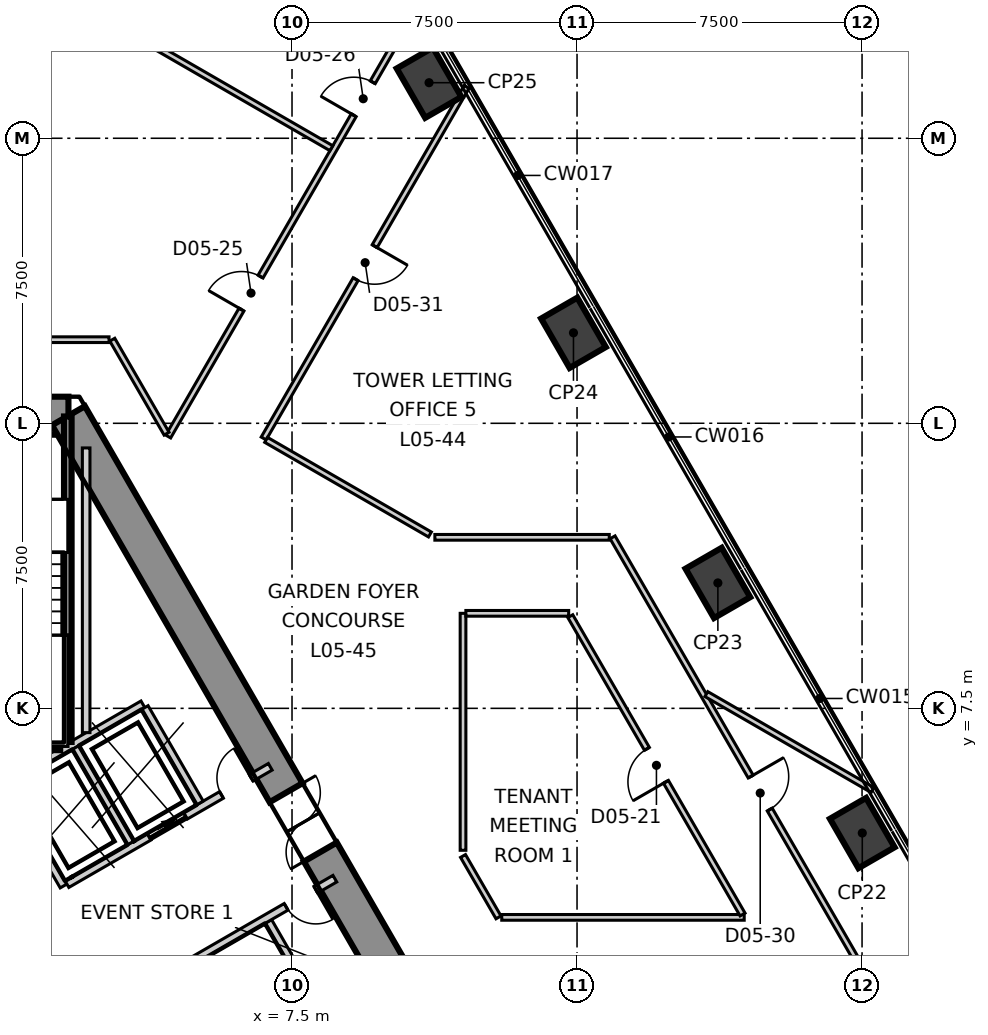
"""IFC4 building model, lengths in metres.
Left out: names, types, materials, properties, quantities, classifications, styles, units other than length and angle.
Written with IfcOpenShell. Run it as: python <this file> out.ifc"""

import sys

from ifc_helpers import new_model, si_unit, direction, frame, frame_2d, origin, origin_2d, place, context, subcontext, project, spatial, polyline, rectangle, outline, extrude, element, fill, save


model = new_model("IFC4")
c1 = context("Model", 3, precision=1e-05, world=origin(), true_north=direction((0.0, 1.0)))
c2 = subcontext(c1, "Body", "Model", "MODEL_VIEW")
j1 = project(units=[si_unit("LENGTHUNIT", "METRE"), si_unit("PLANEANGLEUNIT", "RADIAN")], contexts=[c1])
p1 = place(None, origin())
s1 = spatial("IfcSite", under=j1, at=p1, CompositionType="ELEMENT")
p2 = place(p1, origin())
s2 = spatial("IfcBuilding", under=s1, at=p2, CompositionType="ELEMENT")
p3 = place(p2, frame((0.0, 0.0, 30.3)))
s3 = spatial("IfcBuildingStorey", under=s2, at=p3, CompositionType="ELEMENT", Elevation=30.3)
p4 = place(p3, frame((1.617, 15.2, -0.4), z_axis=(0.0, 0.0, 1.0), x_axis=(-1.0, 0.0, 0.0)))
e1 = element("IfcWall", 1, at=p4, inside=s3, PredefinedType="SHEAR", context=c2, shape_type="SweptSolid", body=[
    extrude(outline(polyline([(-0.288, -0.5), (1.617, -0.5), (3.522, -0.5), (2.945, 0.5), (1.617, 0.5), (0.289, 0.5), (-0.288, -0.5)])), origin(), (0.0, 0.0, 1.0), 5.1),
])
p5 = place(p4, frame((0.917, 0.0, 0.4)))
e2 = element("IfcOpeningElement", 2, at=p5, cuts=e1, PredefinedType="OPENING", context=c2, shape_type="SweptSolid", body=[
    extrude(rectangle(XDim=1.4, YDim=2.1, at=frame_2d((0.7, 1.05))), frame((0.0, 0.51, 0.0), z_axis=(0.0, -1.0, 0.0), x_axis=(1.0, 0.0, 0.0)), (0.0, 0.0, 1.0), 1.02),
])
p6 = place(p3, frame((13.972, -6.2, -0.4), z_axis=(0.0, 0.0, 1.0), x_axis=(-0.499992141631, 0.866029940768, 0.0)))
e3 = element("IfcWall", 3, at=p6, inside=s3, PredefinedType="SHEAR", context=c2, shape_type="SweptSolid", body=[
    extrude(outline(polyline([(-0.288, -0.5), (1.657, -0.5), (3.602, -0.5), (5.547, -0.5), (7.493, -0.5), (9.438, -0.5), (11.383, -0.5), (13.328, -0.5), (15.273, -0.5), (17.218, -0.499), (19.164, -0.499), (21.109, -0.499), (23.054, -0.499), (24.999, -0.499), (24.422, 0.5), (22.566, 0.5), (20.709, 0.5), (18.853, 0.5), (16.996, 0.5), (15.14, 0.5), (13.283, 0.5), (11.427, 0.5), (9.57, 0.5), (7.714, 0.5), (5.857, 0.5), (4.001, 0.5), (2.145, 0.5), (0.288, 0.5), (-0.288, -0.5)])), origin(), (0.0, 0.0, 1.0), 5.1),
])
p7 = place(p6, frame((11.455, 0.0, 0.4)))
e4 = element("IfcOpeningElement", 4, at=p7, cuts=e3, PredefinedType="OPENING", context=c2, shape_type="SweptSolid", body=[
    extrude(rectangle(XDim=1.8, YDim=2.1, at=frame_2d((0.9, 1.05))), frame((0.0, 0.51, 0.0), z_axis=(0.0, -1.0, 0.0), x_axis=(1.0, 0.0, 0.0)), (0.0, 0.0, 1.0), 1.02),
])
for number, where, z_axis, x_axis in (
    (5, (22.506, 4.219, -0.4), (0.0, 0.0, 1.0), (-0.5, 0.866, 0.0)),
    (6, (18.706, 10.8, -0.4), (0.0, 0.0, 1.0), (-0.5, 0.866, 0.0)),
    (7, (14.906, 17.381, -0.4), (0.0, 0.0, 1.0), (-0.5, 0.866, 0.0)),
    (8, (11.106, 23.962, -0.4), (0.0, 0.0, 1.0), (-0.5, 0.866, 0.0)),
):
    element("IfcColumn", number, at=place(p3, frame(where, z_axis=z_axis, x_axis=x_axis)), inside=s3, PredefinedType="COLUMN", context=c2, shape_type="SweptSolid", body=[
        extrude(rectangle(XDim=1.5, YDim=1.1, at=origin_2d()), origin(), (0.0, 0.0, 1.0), 5.1),
    ])
p8 = place(p3, frame((4.242, 14.652, 0.0), z_axis=(0.0, 0.0, 1.0), x_axis=(0.500016782699, 0.866015714072, 0.0)))
e9 = element("IfcWall", 9, at=p8, inside=s3, PredefinedType="PARTITIONING", context=c2, shape_type="SweptSolid", body=[
    extrude(rectangle(XDim=13.164, YDim=0.15, at=frame_2d((6.582, 0.0))), origin(), (0.0, 0.0, 1.0), 4.7),
])
p9 = place(p8, frame((3.858, 0.0, 0.0)))
e10 = element("IfcOpeningElement", 10, at=p9, cuts=e9, PredefinedType="OPENING", context=c2, shape_type="SweptSolid", body=[
    extrude(rectangle(XDim=1.0, YDim=2.1, at=frame_2d((0.5, 1.05))), frame((0.0, 0.085, 0.0), z_axis=(0.0, -1.0, 0.0), x_axis=(1.0, 0.0, 0.0)), (0.0, 0.0, 1.0), 0.17),
])
p10 = place(p8, frame((9.763, 0.0, 0.0)))
e11 = element("IfcOpeningElement", 11, at=p10, cuts=e9, PredefinedType="OPENING", context=c2, shape_type="SweptSolid", body=[
    extrude(rectangle(XDim=1.0, YDim=2.1, at=frame_2d((0.5, 1.05))), frame((0.0, 0.085, 0.0), z_axis=(0.0, -1.0, 0.0), x_axis=(1.0, 0.0, 0.0)), (0.0, 0.0, 1.0), 0.17),
])
p11 = place(p3, frame((6.754, 14.601, 0.0), z_axis=(0.0, 0.0, 1.0), x_axis=(0.499932177464, 0.866064557603, 0.0)))
e12 = element("IfcWall", 12, at=p11, inside=s3, PredefinedType="PARTITIONING", context=c2, shape_type="SweptSolid", body=[
    extrude(rectangle(XDim=10.682, YDim=0.15, at=frame_2d((5.341, 0.0))), origin(), (0.0, 0.0, 1.0), 4.1),
])
p12 = place(p11, frame((4.841, 0.0, 0.0)))
e13 = element("IfcOpeningElement", 13, at=p12, cuts=e12, PredefinedType="OPENING", context=c2, shape_type="SweptSolid", body=[
    extrude(rectangle(XDim=1.0, YDim=2.1, at=frame_2d((0.5, 1.05))), frame((0.0, 0.085, 0.0), z_axis=(0.0, -1.0, 0.0), x_axis=(1.0, 0.0, 0.0)), (0.0, 0.0, 1.0), 0.17),
])
p13 = place(p3, frame((-7.635, 31.575, 0.0), z_axis=(0.0, 0.0, 1.0), x_axis=(0.866010527476, -0.500025765638, 0.0)))
e14 = element("IfcWall", 14, at=p13, inside=s3, PredefinedType="PARTITIONING", context=c2, shape_type="SweptSolid", body=[
    extrude(rectangle(XDim=18.673, YDim=0.15, at=frame_2d((9.336, 0.0))), origin(), (0.0, 0.0, 1.0), 4.7),
])
p14 = place(p3, frame((2.771, 17.2, 0.0), z_axis=(0.0, 0.0, 1.0), x_axis=(0.500065346707, -0.865987672558, 0.0)))
e15 = element("IfcWall", 15, at=p14, inside=s3, PredefinedType="PARTITIONING", context=c2, shape_type="SweptSolid", body=[
    extrude(rectangle(XDim=2.855, YDim=0.15, at=frame_2d((1.428, 0.0))), origin(), (0.0, 0.0, 1.0), 4.7),
])
p15 = place(p3, frame((-2.685, 17.2, 0.0), z_axis=(0.0, 0.0, 1.0), x_axis=(1.0, 0.0, 0.0)))
e16 = element("IfcWall", 16, at=p15, inside=s3, PredefinedType="PARTITIONING", context=c2, shape_type="SweptSolid", body=[
    extrude(rectangle(XDim=5.37, YDim=0.15, at=frame_2d((2.685, 0.0))), origin(), (0.0, 0.0, 1.0), 4.7),
])
p16 = place(p3, frame((15.935, 12.0, 0.0), z_axis=(0.0, 0.0, 1.0), x_axis=(0.500004336333, -0.866022900187, 0.0)))
e17 = element("IfcWall", 17, at=p16, inside=s3, PredefinedType="PARTITIONING", context=c2, shape_type="SweptSolid", body=[
    extrude(rectangle(XDim=13.77, YDim=0.15, at=frame_2d((6.885, 0.0))), origin(), (0.0, 0.0, 1.0), 4.7),
])
p17 = place(p16, frame((7.27, 0.0, 0.0)))
e18 = element("IfcOpeningElement", 18, at=p17, cuts=e17, PredefinedType="OPENING", context=c2, shape_type="SweptSolid", body=[
    extrude(rectangle(XDim=1.0, YDim=2.1, at=frame_2d((0.5, 1.05))), frame((0.0, 0.085, 0.0), z_axis=(0.0, -1.0, 0.0), x_axis=(1.0, 0.0, 0.0)), (0.0, 0.0, 1.0), 0.17),
])
p18 = place(p3, frame((11.259, 12.0, 0.0), z_axis=(0.0, 0.0, 1.0), x_axis=(1.0, 0.0, 0.0)))
e19 = element("IfcWall", 19, at=p18, inside=s3, PredefinedType="PARTITIONING", context=c2, shape_type="SweptSolid", body=[
    extrude(rectangle(XDim=4.589, YDim=0.15, at=frame_2d((2.294, 0.0))), origin(), (0.0, 0.0, 1.0), 4.7),
])
p19 = place(p3, frame((6.819, 14.564, 0.0), z_axis=(0.0, 0.0, 1.0), x_axis=(0.865960914513, -0.500111682063, 0.0)))
e20 = element("IfcWall", 20, at=p19, inside=s3, PredefinedType="PARTITIONING", context=c2, shape_type="SweptSolid", body=[
    extrude(rectangle(XDim=4.977, YDim=0.15, at=frame_2d((2.488, 0.0))), origin(), (0.0, 0.0, 1.0), 4.7),
])
p20 = place(p3, frame((18.403, 7.875, 0.0), z_axis=(0.0, 0.0, 1.0), x_axis=(0.866002805745, -0.50003913891, 0.0)))
e21 = element("IfcWall", 21, at=p20, inside=s3, PredefinedType="PARTITIONING", context=c2, shape_type="SweptSolid", body=[
    extrude(rectangle(XDim=5.049, YDim=0.15, at=frame_2d((2.525, 0.0))), origin(), (0.0, 0.0, 1.0), 4.7),
])
p21 = place(p3, frame((12.0, 3.615, 0.0), z_axis=(0.0, 0.0, 1.0), x_axis=(0.500277597875, -0.865865073245, 0.0)))
e22 = element("IfcWall", 22, at=p21, inside=s3, PredefinedType="PARTITIONING", context=c2, shape_type="SweptSolid", body=[
    extrude(rectangle(XDim=1.865, YDim=0.15, at=frame_2d((0.933, 0.0))), origin(), (0.0, 0.0, 1.0), 4.7),
])
p22 = place(p3, frame((13.019, 2.0, 0.0), z_axis=(0.0, 0.0, 1.0), x_axis=(1.0, 0.0, 0.0)))
e23 = element("IfcWall", 23, at=p22, inside=s3, PredefinedType="PARTITIONING", context=c2, shape_type="SweptSolid", body=[
    extrude(rectangle(XDim=6.38, YDim=0.15, at=frame_2d((3.19, 0.0))), origin(), (0.0, 0.0, 1.0), 4.7),
])
p23 = place(p3, frame((12.0, 3.765, 0.0), z_axis=(0.0, 0.0, 1.0), x_axis=(0.0, 1.0, 0.0)))
e24 = element("IfcWall", 24, at=p23, inside=s3, PredefinedType="PARTITIONING", context=c2, shape_type="SweptSolid", body=[
    extrude(rectangle(XDim=6.235, YDim=0.15, at=frame_2d((3.118, 0.0))), origin(), (0.0, 0.0, 1.0), 4.7),
])
p24 = place(p3, frame((12.075, 10.0, 0.0), z_axis=(0.0, 0.0, 1.0), x_axis=(1.0, 0.0, 0.0)))
e25 = element("IfcWall", 25, at=p24, inside=s3, PredefinedType="PARTITIONING", context=c2, shape_type="SweptSolid", body=[
    extrude(rectangle(XDim=2.705, YDim=0.15, at=frame_2d((1.353, 0.0))), origin(), (0.0, 0.0, 1.0), 4.7),
])
p25 = place(p3, frame((14.823, 9.925, 0.0), z_axis=(0.0, 0.0, 1.0), x_axis=(0.500058162134, -0.865991821256, 0.0)))
e26 = element("IfcWall", 26, at=p25, inside=s3, PredefinedType="PARTITIONING", context=c2, shape_type="SweptSolid", body=[
    extrude(rectangle(XDim=9.065, YDim=0.15, at=frame_2d((4.532, 0.0))), origin(), (0.0, 0.0, 1.0), 4.7),
])
p26 = place(p25, frame((4.032, 0.0, 0.0)))
e27 = element("IfcOpeningElement", 27, at=p26, cuts=e26, PredefinedType="OPENING", context=c2, shape_type="SweptSolid", body=[
    extrude(rectangle(XDim=1.0, YDim=2.1, at=frame_2d((0.5, 1.05))), frame((0.0, 0.085, 0.0), z_axis=(0.0, -1.0, 0.0), x_axis=(1.0, 0.0, 0.0)), (0.0, 0.0, 1.0), 0.17),
])
p27 = place(p3, frame((-0.002, 5.541, 0.0), z_axis=(0.0, 0.0, 1.0), x_axis=(0.86600155993, 0.500041296494, 0.0)))
e28 = element("IfcWall", 28, at=p27, inside=s3, PredefinedType="SOLIDWALL", context=c2, shape_type="SweptSolid", body=[
    extrude(rectangle(XDim=4.132, YDim=0.2, at=frame_2d((2.066, 0.0))), origin(), (0.0, 0.0, 1.0), 4.7),
])
p28 = place(p3, frame((0.0, 5.4, 0.0), z_axis=(0.0, 0.0, 1.0), x_axis=(0.500103862429, -0.865965430478, 0.0)))
e29 = element("IfcWall", 29, at=p28, inside=s3, PredefinedType="SOLIDWALL", context=c2, shape_type="SweptSolid", body=[
    extrude(rectangle(XDim=2.973, YDim=0.2, at=frame_2d((1.487, 0.0))), origin(), (0.0, 0.0, 1.0), 4.7),
])
p29 = place(p28, frame((0.937, 0.0, 0.0)))
e30 = element("IfcOpeningElement", 30, at=p29, cuts=e29, PredefinedType="OPENING", context=c2, shape_type="SweptSolid", body=[
    extrude(rectangle(XDim=1.1, YDim=2.1, at=frame_2d((0.55, 1.05))), frame((0.0, 0.11, 0.0), z_axis=(0.0, -1.0, 0.0), x_axis=(1.0, 0.0, 0.0)), (0.0, 0.0, 1.0), 0.22),
])
p30 = place(p3, frame((1.578, 2.874, 0.0), z_axis=(0.0, 0.0, 1.0), x_axis=(0.866055259465, 0.499948284879, 0.0)))
e31 = element("IfcWall", 31, at=p30, inside=s3, PredefinedType="SOLIDWALL", context=c2, shape_type="SweptSolid", body=[
    extrude(rectangle(XDim=6.177, YDim=0.2, at=frame_2d((3.088, 0.0))), origin(), (0.0, 0.0, 1.0), 4.7),
])
p31 = place(p30, frame((2.496, 0.0, 0.0)))
e32 = element("IfcOpeningElement", 32, at=p31, cuts=e31, PredefinedType="OPENING", context=c2, shape_type="SweptSolid", body=[
    extrude(rectangle(XDim=1.1, YDim=2.1, at=frame_2d((0.55, 1.05))), frame((0.0, 0.11, 0.0), z_axis=(0.0, -1.0, 0.0), x_axis=(1.0, 0.0, 0.0)), (0.0, 0.0, 1.0), 0.22),
])
p32 = place(p30, frame((4.696, 0.0, 0.0)))
e33 = element("IfcOpeningElement", 33, at=p32, cuts=e31, PredefinedType="OPENING", context=c2, shape_type="SweptSolid", body=[
    extrude(rectangle(XDim=0.9, YDim=2.1, at=frame_2d((0.45, 1.05))), frame((0.0, 0.11, 0.0), z_axis=(0.0, -1.0, 0.0), x_axis=(1.0, 0.0, 0.0)), (0.0, 0.0, 1.0), 0.22),
])
for number, where, z_axis, x_axis in (
    (34, (1.807, 6.47, 0.0), (0.0, 0.0, 1.0), (0.5, -0.866, 0.0)),
    (35, (3.626, 7.52, 0.0), (0.0, 0.0, 1.0), (0.5, -0.866, 0.0)),
):
    element("IfcWall", number, at=place(p3, frame(where, z_axis=z_axis, x_axis=x_axis)), inside=s3, PredefinedType="SOLIDWALL", context=c2, shape_type="SweptSolid", body=[
        extrude(rectangle(XDim=2.9, YDim=0.2, at=frame_2d((1.45, 0.0))), origin(), (0.0, 0.0, 1.0), 4.7),
    ])
p33 = place(p3, frame((6.876, 1.891, 0.0), z_axis=(0.0, 0.0, 1.0), x_axis=(0.499990139034, -0.866031096941, 0.0)))
e36 = element("IfcWall", 36, at=p33, inside=s3, PredefinedType="SOLIDWALL", context=c2, shape_type="SweptSolid", body=[
    extrude(rectangle(XDim=3.0, YDim=0.2, at=frame_2d((1.5, 0.0))), origin(), (0.0, 0.0, 1.0), 4.7),
])
p34 = place(p3, frame((3.278, -0.071, 0.0), z_axis=(0.0, 0.0, 1.0), x_axis=(0.865959795517, 0.500113619639, 0.0)))
e37 = element("IfcWall", 37, at=p34, inside=s3, PredefinedType="SOLIDWALL", context=c2, shape_type="SweptSolid", body=[
    extrude(rectangle(XDim=6.177, YDim=0.2, at=frame_2d((3.088, 0.0))), origin(), (0.0, 0.0, 1.0), 4.7),
])
p35 = place(p34, frame((4.697, 0.0, 0.0)))
e38 = element("IfcOpeningElement", 38, at=p35, cuts=e37, PredefinedType="OPENING", context=c2, shape_type="SweptSolid", body=[
    extrude(rectangle(XDim=0.9, YDim=2.1, at=frame_2d((0.45, 1.05))), frame((0.0, 0.11, 0.0), z_axis=(0.0, -1.0, 0.0), x_axis=(1.0, 0.0, 0.0)), (0.0, 0.0, 1.0), 0.22),
])
p36 = place(p3, frame((2.083, 6.861, 0.0), z_axis=(0.0, 0.0, 1.0), x_axis=(0.0, 1.0, 0.0)))
e39 = element("IfcWall", 39, at=p36, inside=s3, PredefinedType="SOLIDWALL", context=c2, shape_type="SweptSolid", body=[
    extrude(rectangle(XDim=7.491, YDim=0.2, at=frame_2d((3.746, 0.0))), origin(), (0.0, 0.0, 1.0), 4.7),
])
p37 = place(p3, frame((1.6, 6.615, 0.0), z_axis=(0.0, 0.0, 1.0), x_axis=(0.0, 1.0, 0.0)))
e40 = element("IfcWall", 40, at=p37, inside=s3, PredefinedType="SOLIDWALL", context=c2, shape_type="SweptSolid", body=[
    extrude(rectangle(XDim=8.565, YDim=0.2, at=frame_2d((4.282, 0.0))), origin(), (0.0, 0.0, 1.0), 4.7),
])
p38 = place(p3, frame((-1.4, 6.5, 0.0), z_axis=(0.0, 0.0, 1.0), x_axis=(1.0, 0.0, 0.0)))
e41 = element("IfcWall", 41, at=p38, inside=s3, PredefinedType="SOLIDWALL", context=c2, shape_type="SweptSolid", body=[
    extrude(rectangle(XDim=2.8, YDim=0.2, at=frame_2d((1.4, 0.0))), origin(), (0.0, 0.0, 1.0), 4.7),
])
p39 = place(p31, origin())
e42 = element("IfcDoor", 42, at=p39, inside=s3, OperationType="SLIDING_TO_LEFT", PredefinedType="DOOR", context=c2, shape_type="SweptSolid", body=[
    extrude(rectangle(XDim=1.1, YDim=2.1, at=frame_2d((0.55, 1.05))), frame((0.0, 0.025, 0.0), z_axis=(0.0, -1.0, 0.0), x_axis=(1.0, 0.0, 0.0)), (0.0, 0.0, 1.0), 0.05),
])
fill(e32, e42)
p40 = place(p26, origin())
e43 = element("IfcDoor", 43, at=p40, inside=s3, OperationType="SINGLE_SWING_RIGHT", PredefinedType="DOOR", context=c2, shape_type="SweptSolid", body=[
    extrude(rectangle(XDim=1.0, YDim=2.1, at=frame_2d((0.5, 1.05))), frame((0.0, 0.025, 0.0), z_axis=(0.0, -1.0, 0.0), x_axis=(1.0, 0.0, 0.0)), (0.0, 0.0, 1.0), 0.05),
])
fill(e27, e43)
p41 = place(p9, origin())
e44 = element("IfcDoor", 44, at=p41, inside=s3, OperationType="SINGLE_SWING_RIGHT", PredefinedType="DOOR", context=c2, shape_type="SweptSolid", body=[
    extrude(rectangle(XDim=1.0, YDim=2.1, at=frame_2d((0.5, 1.05))), frame((0.0, 0.025, 0.0), z_axis=(0.0, -1.0, 0.0), x_axis=(1.0, 0.0, 0.0)), (0.0, 0.0, 1.0), 0.05),
])
fill(e10, e44)
p42 = place(p10, origin())
e45 = element("IfcDoor", 45, at=p42, inside=s3, OperationType="SINGLE_SWING_RIGHT", PredefinedType="DOOR", context=c2, shape_type="SweptSolid", body=[
    extrude(rectangle(XDim=1.0, YDim=2.1, at=frame_2d((0.5, 1.05))), frame((0.0, 0.025, 0.0), z_axis=(0.0, -1.0, 0.0), x_axis=(1.0, 0.0, 0.0)), (0.0, 0.0, 1.0), 0.05),
])
fill(e11, e45)
p43 = place(p17, origin())
e46 = element("IfcDoor", 46, at=p43, inside=s3, OperationType="SINGLE_SWING_RIGHT", PredefinedType="DOOR", context=c2, shape_type="SweptSolid", body=[
    extrude(rectangle(XDim=1.0, YDim=2.1, at=frame_2d((0.5, 1.05))), frame((0.0, 0.025, 0.0), z_axis=(0.0, -1.0, 0.0), x_axis=(1.0, 0.0, 0.0)), (0.0, 0.0, 1.0), 0.05),
])
fill(e18, e46)
p44 = place(p12, origin())
e47 = element("IfcDoor", 47, at=p44, inside=s3, OperationType="SINGLE_SWING_RIGHT", PredefinedType="DOOR", context=c2, shape_type="SweptSolid", body=[
    extrude(rectangle(XDim=1.0, YDim=2.1, at=frame_2d((0.5, 1.05))), frame((0.0, 0.025, 0.0), z_axis=(0.0, -1.0, 0.0), x_axis=(1.0, 0.0, 0.0)), (0.0, 0.0, 1.0), 0.05),
])
fill(e13, e47)
p45 = place(p7, origin())
e48 = element("IfcDoor", 48, at=p45, inside=s3, OperationType="DOUBLE_DOOR_SINGLE_SWING", PredefinedType="DOOR", context=c2, shape_type="SweptSolid", body=[
    extrude(rectangle(XDim=1.8, YDim=2.1, at=frame_2d((0.9, 1.05))), frame((0.0, 0.025, 0.0), z_axis=(0.0, -1.0, 0.0), x_axis=(1.0, 0.0, 0.0)), (0.0, 0.0, 1.0), 0.05),
])
fill(e4, e48)
p46 = place(p32, origin())
e49 = element("IfcDoor", 49, at=p46, inside=s3, OperationType="SINGLE_SWING_LEFT", PredefinedType="DOOR", context=c2, shape_type="SweptSolid", body=[
    extrude(rectangle(XDim=0.9, YDim=2.1, at=frame_2d((0.45, 1.05))), frame((0.0, 0.025, 0.0), z_axis=(0.0, -1.0, 0.0), x_axis=(1.0, 0.0, 0.0)), (0.0, 0.0, 1.0), 0.05),
])
fill(e33, e49)
p47 = place(p35, origin())
e50 = element("IfcDoor", 50, at=p47, inside=s3, OperationType="SINGLE_SWING_RIGHT", PredefinedType="DOOR", context=c2, shape_type="SweptSolid", body=[
    extrude(rectangle(XDim=0.9, YDim=2.1, at=frame_2d((0.45, 1.05))), frame((0.0, 0.025, 0.0), z_axis=(0.0, -1.0, 0.0), x_axis=(1.0, 0.0, 0.0)), (0.0, 0.0, 1.0), 0.05),
])
fill(e38, e50)
save(model, sys.argv[1])
